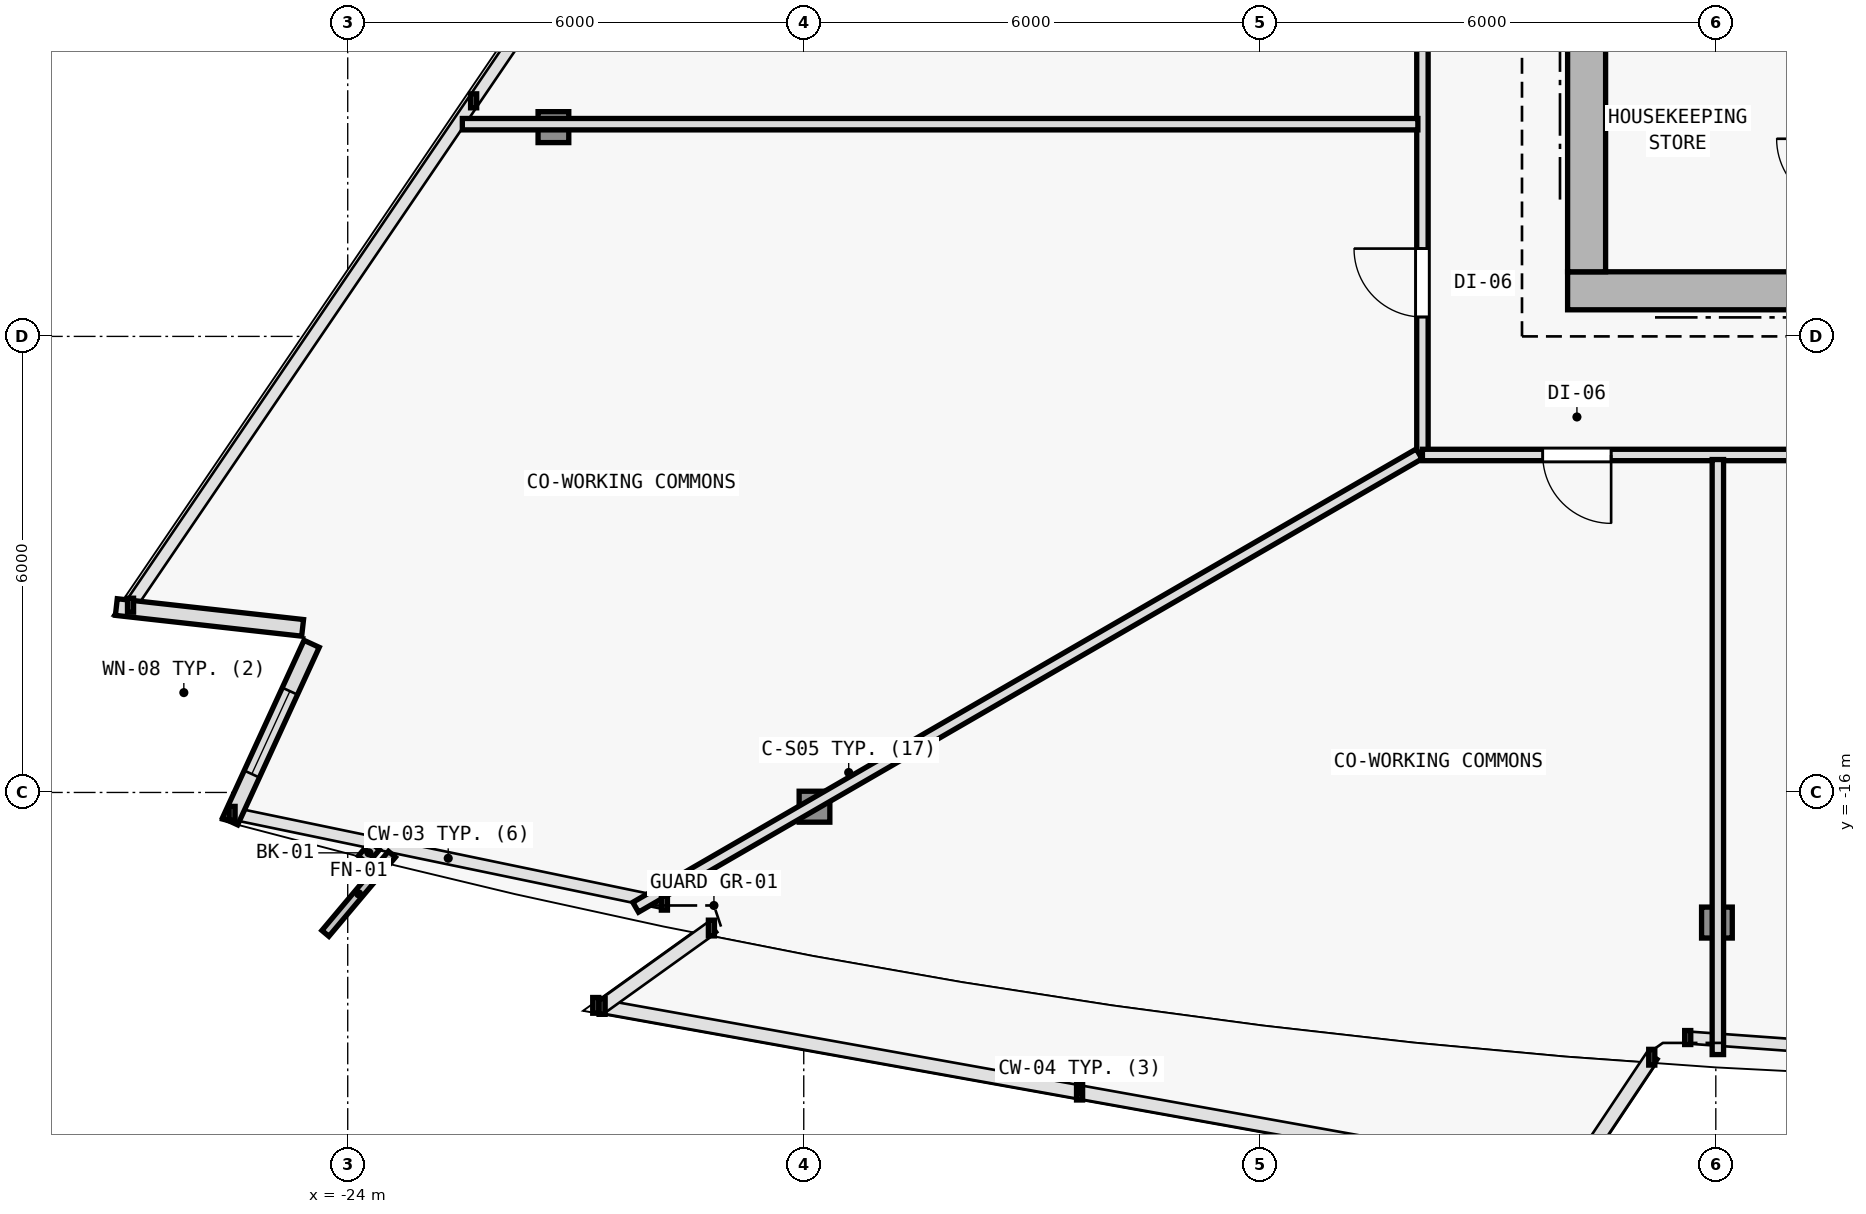
"""IFC4 building model, lengths in metres.
Left out: names, types, materials, properties, quantities, classifications, styles, units other than length and angle.
Written with IfcOpenShell. Run it as: python <this file> out.ifc"""

import sys

from ifc_helpers import new_model, si_unit, direction, frame, frame_2d, origin, origin_2d, place, context, subcontext, project, spatial, rectangle, i_section, extrude, element, fill, save


model = new_model("IFC4")
c1 = context("Model", 3, precision=1e-05, world=origin(), true_north=direction((0.0, 1.0)))
c2 = subcontext(c1, "Body", "Model", "MODEL_VIEW")
j1 = project(units=[si_unit("LENGTHUNIT", "METRE"), si_unit("PLANEANGLEUNIT", "RADIAN")], contexts=[c1])
p1 = place(None, origin())
s1 = spatial("IfcSite", under=j1, at=p1, CompositionType="ELEMENT")
p2 = place(p1, origin())
s2 = spatial("IfcBuilding", under=s1, at=p2, CompositionType="ELEMENT")
p3 = place(p2, frame((0.0, 0.0, 153.0)))
s3 = spatial("IfcBuildingStorey", under=s2, at=p3, CompositionType="ELEMENT", Elevation=153.0)
p4 = place(p3, frame((-7.7, -9.4, 0.0), z_axis=(0.0, 0.0, 1.0), x_axis=(1.0, 0.0, 0.0)))
e1 = element("IfcColumn", 1, at=p4, inside=s3, PredefinedType="COLUMN", context=c2, shape_type="SweptSolid", body=[
    extrude(i_section(OverallWidth=0.404, OverallDepth=0.407, WebThickness=0.017, FlangeThickness=0.028, FilletRadius=0.015, at=origin_2d()), origin(), (0.0, 0.0, 1.0), 3.6),
])
p5 = place(p3, frame((-17.859, -16.187, 0.006), z_axis=(0.020596292833, 0.033511459955, 0.999226087917), x_axis=(-0.851954850327, 0.523615252838, 0.0)))
e2 = element("IfcColumn", 2, at=p5, inside=s3, PredefinedType="COLUMN", context=c2, shape_type="SweptSolid", body=[
    extrude(i_section(OverallWidth=0.404, OverallDepth=0.407, WebThickness=0.017, FlangeThickness=0.028, FilletRadius=0.015, at=origin_2d()), origin(), (0.0, 0.0, 1.0), 3.592),
])
p6 = place(p3, frame((-5.985, -17.712, 0.006), z_axis=(0.006866324617, 0.035215407439, 0.999356157066), x_axis=(-0.981516643497, 0.191376797284, 0.0)))
e3 = element("IfcColumn", 3, at=p6, inside=s3, PredefinedType="COLUMN", context=c2, shape_type="SweptSolid", body=[
    extrude(i_section(OverallWidth=0.404, OverallDepth=0.407, WebThickness=0.017, FlangeThickness=0.028, FilletRadius=0.015, at=origin_2d()), origin(), (0.0, 0.0, 1.0), 3.591),
])
p7 = place(p3, frame((-21.294, -7.247, 0.006), z_axis=(0.025292109804, 0.02162067451, 0.999446274502), x_axis=(-0.649781149204, 0.760121344352, 0.0)))
e4 = element("IfcColumn", 4, at=p7, inside=s3, PredefinedType="COLUMN", context=c2, shape_type="SweptSolid", body=[
    extrude(i_section(OverallWidth=0.404, OverallDepth=0.407, WebThickness=0.017, FlangeThickness=0.028, FilletRadius=0.015, at=origin_2d()), origin(), (0.0, 0.0, 1.0), 3.591),
])
p8 = place(p3, frame((-24.594, -13.834, 0.0), z_axis=(0.0, 0.0, 1.0), x_axis=(-0.993823222634, 0.110974781609, 0.0)))
e5 = element("IfcWall", 5, at=p8, inside=s3, PredefinedType="SOLIDWALL", context=c2, shape_type="SweptSolid", body=[
    extrude(rectangle(XDim=2.466, YDim=0.22, at=frame_2d((1.233, 0.0))), origin(), (0.0, 0.0, 1.0), 3.35),
])
p9 = place(p3, frame((-25.548, -16.38, 0.0), z_axis=(0.0, 0.0, 1.0), x_axis=(0.417449299542, 0.908700215864, 0.0)))
e6 = element("IfcWall", 6, at=p9, inside=s3, PredefinedType="SOLIDWALL", context=c2, shape_type="SweptSolid", body=[
    extrude(rectangle(XDim=2.57, YDim=0.22, at=frame_2d((1.285, 0.0))), origin(), (0.0, 0.0, 1.0), 3.35),
])
p10 = place(p9, frame((0.685, 0.0, 0.62)))
e7 = element("IfcOpeningElement", 7, at=p10, cuts=e6, PredefinedType="OPENING", context=c2, shape_type="SweptSolid", body=[
    extrude(rectangle(XDim=1.2, YDim=1.8, at=frame_2d((0.6, 0.9))), frame((0.0, 0.12, 0.0), z_axis=(0.0, -1.0, 0.0), x_axis=(1.0, 0.0, 0.0)), (0.0, 0.0, 1.0), 0.24),
])
p11 = place(p3, frame((-7.95, -9.4, 0.0), z_axis=(0.0, 0.0, 1.0), x_axis=(1.0, 0.0, 0.0)))
e8 = element("IfcWall", 8, at=p11, inside=s3, PredefinedType="SHEAR", context=c2, shape_type="SweptSolid", body=[
    extrude(rectangle(XDim=15.9, YDim=0.5, at=frame_2d((7.95, 0.0))), origin(), (0.0, 0.0, 1.0), 3.35),
])
p12 = place(p11, frame((9.6, 0.0, 0.0)))
e9 = element("IfcOpeningElement", 9, at=p12, cuts=e8, PredefinedType="OPENING", context=c2, shape_type="SweptSolid", body=[
    extrude(rectangle(XDim=1.5, YDim=2.2, at=frame_2d((0.75, 1.1))), frame((0.0, 0.26, 0.0), z_axis=(0.0, -1.0, 0.0), x_axis=(1.0, 0.0, 0.0)), (0.0, 0.0, 1.0), 0.52),
])
p13 = place(p3, frame((-7.7, -9.15, 0.0), z_axis=(0.0, 0.0, 1.0), x_axis=(0.0, 1.0, 0.0)))
e10 = element("IfcWall", 10, at=p13, inside=s3, PredefinedType="SHEAR", context=c2, shape_type="SweptSolid", body=[
    extrude(rectangle(XDim=19.1, YDim=0.5, at=frame_2d((9.55, 0.0))), origin(), (0.0, 0.0, 1.0), 3.35),
])
p14 = place(p13, frame((12.7, 0.0, 0.0)))
e11 = element("IfcOpeningElement", 11, at=p14, cuts=e10, PredefinedType="OPENING", context=c2, shape_type="SweptSolid", body=[
    extrude(rectangle(XDim=1.1, YDim=2.15, at=frame_2d((0.55, 1.075))), frame((0.0, 0.26, 0.0), z_axis=(0.0, -1.0, 0.0), x_axis=(1.0, 0.0, 0.0)), (0.0, 0.0, 1.0), 0.52),
])
p15 = place(p3, frame((-9.86, -11.56, 0.0), z_axis=(0.0, 0.0, 1.0), x_axis=(0.0, 1.0, 0.0)))
e12 = element("IfcWall", 12, at=p15, inside=s3, PredefinedType="PARTITIONING", context=c2, shape_type="SweptSolid", body=[
    extrude(rectangle(XDim=19.986, YDim=0.15, at=frame_2d((9.993, 0.0))), origin(), (0.0, 0.0, 1.0), 2.775),
])
p16 = place(p15, frame((11.446, 0.0, 0.0)))
e13 = element("IfcOpeningElement", 13, at=p16, cuts=e12, PredefinedType="OPENING", context=c2, shape_type="SweptSolid", body=[
    extrude(rectangle(XDim=0.85, YDim=2.1, at=frame_2d((0.425, 1.05))), frame((0.0, 0.085, 0.0), z_axis=(0.0, -1.0, 0.0), x_axis=(1.0, 0.0, 0.0)), (0.0, 0.0, 1.0), 0.17),
])
p17 = place(p15, frame((10.069, 0.0, 0.0)))
e14 = element("IfcOpeningElement", 14, at=p17, cuts=e12, PredefinedType="OPENING", context=c2, shape_type="SweptSolid", body=[
    extrude(rectangle(XDim=0.85, YDim=2.1, at=frame_2d((0.425, 1.05))), frame((0.0, 0.085, 0.0), z_axis=(0.0, -1.0, 0.0), x_axis=(1.0, 0.0, 0.0)), (0.0, 0.0, 1.0), 0.17),
])
p18 = place(p15, frame((8.15, 0.0, 0.0)))
e15 = element("IfcOpeningElement", 15, at=p18, cuts=e12, PredefinedType="OPENING", context=c2, shape_type="SweptSolid", body=[
    extrude(rectangle(XDim=0.9, YDim=2.1, at=frame_2d((0.45, 1.05))), frame((0.0, 0.085, 0.0), z_axis=(0.0, -1.0, 0.0), x_axis=(1.0, 0.0, 0.0)), (0.0, 0.0, 1.0), 0.17),
])
p19 = place(p15, frame((5.396, 0.0, 0.0)))
e16 = element("IfcOpeningElement", 16, at=p19, cuts=e12, PredefinedType="OPENING", context=c2, shape_type="SweptSolid", body=[
    extrude(rectangle(XDim=0.9, YDim=2.1, at=frame_2d((0.45, 1.05))), frame((0.0, 0.085, 0.0), z_axis=(0.0, -1.0, 0.0), x_axis=(1.0, 0.0, 0.0)), (0.0, 0.0, 1.0), 0.17),
])
p20 = place(p15, frame((1.815, 0.0, 0.0)))
e17 = element("IfcOpeningElement", 17, at=p20, cuts=e12, PredefinedType="OPENING", context=c2, shape_type="SweptSolid", body=[
    extrude(rectangle(XDim=0.9, YDim=2.1, at=frame_2d((0.45, 1.05))), frame((0.0, 0.085, 0.0), z_axis=(0.0, -1.0, 0.0), x_axis=(1.0, 0.0, 0.0)), (0.0, 0.0, 1.0), 0.17),
])
p21 = place(p15, frame((13.306, 0.0, 0.0)))
e18 = element("IfcOpeningElement", 18, at=p21, cuts=e12, PredefinedType="OPENING", context=c2, shape_type="SweptSolid", body=[
    extrude(rectangle(XDim=0.9, YDim=2.1, at=frame_2d((0.45, 1.05))), frame((0.0, 0.085, 0.0), z_axis=(0.0, -1.0, 0.0), x_axis=(1.0, 0.0, 0.0)), (0.0, 0.0, 1.0), 0.17),
])
p22 = place(p3, frame((13.18, -11.56, 0.0), z_axis=(0.0, 0.0, 1.0), x_axis=(-1.0, 0.0, 0.0)))
e19 = element("IfcWall", 19, at=p22, inside=s3, PredefinedType="PARTITIONING", context=c2, shape_type="SweptSolid", body=[
    extrude(rectangle(XDim=23.04, YDim=0.15, at=frame_2d((11.52, 0.0))), origin(), (0.0, 0.0, 1.0), 2.725),
])
p23 = place(p22, frame((20.557, 0.0, 0.0)))
e20 = element("IfcOpeningElement", 20, at=p23, cuts=e19, PredefinedType="OPENING", context=c2, shape_type="SweptSolid", body=[
    extrude(rectangle(XDim=0.9, YDim=2.1, at=frame_2d((0.45, 1.05))), frame((0.0, 0.085, 0.0), z_axis=(0.0, -1.0, 0.0), x_axis=(1.0, 0.0, 0.0)), (0.0, 0.0, 1.0), 0.17),
])
p24 = place(p22, frame((10.328, 0.0, 0.0)))
e21 = element("IfcOpeningElement", 21, at=p24, cuts=e19, PredefinedType="OPENING", context=c2, shape_type="SweptSolid", body=[
    extrude(rectangle(XDim=0.9, YDim=2.1, at=frame_2d((0.45, 1.05))), frame((0.0, 0.085, 0.0), z_axis=(0.0, -1.0, 0.0), x_axis=(1.0, 0.0, 0.0)), (0.0, 0.0, 1.0), 0.17),
])
p25 = place(p3, frame((-9.903, -11.546, 0.0), z_axis=(0.0, 0.0, 1.0), x_axis=(-0.865562397441, -0.500801094384, 0.0)))
e22 = element("IfcWall", 22, at=p25, inside=s3, PredefinedType="PARTITIONING", context=c2, shape_type="SweptSolid", body=[
    extrude(rectangle(XDim=11.909, YDim=0.15, at=frame_2d((5.955, 0.0))), origin(), (0.0, 0.0, 1.0), 2.775),
])
p26 = place(p3, frame((-5.973, -11.62, 0.0), z_axis=(0.0, 0.0, 1.0), x_axis=(0.0, -1.0, 0.0)))
e23 = element("IfcWall", 23, at=p26, inside=s3, PredefinedType="PARTITIONING", context=c2, shape_type="SweptSolid", body=[
    extrude(rectangle(XDim=7.828, YDim=0.15, at=frame_2d((3.914, 0.0))), origin(), (0.0, 0.0, 1.0), 2.885),
])
p27 = place(p3, frame((-9.92, -7.208, 0.0), z_axis=(0.0, 0.0, 1.0), x_axis=(-1.0, 0.0, 0.0)))
e24 = element("IfcWall", 24, at=p27, inside=s3, PredefinedType="PARTITIONING", context=c2, shape_type="SweptSolid", body=[
    extrude(rectangle(XDim=12.572, YDim=0.15, at=frame_2d((6.286, 0.0))), origin(), (0.0, 0.0, 1.0), 2.775),
])
p28 = place(p10, origin())
e25 = element("IfcWindow", 25, at=p28, inside=s3, PartitioningType="SINGLE_PANEL", PredefinedType="WINDOW", context=c2, shape_type="SweptSolid", body=[
    extrude(rectangle(XDim=1.2, YDim=1.8, at=frame_2d((0.6, 0.9))), frame((0.0, 0.03, 0.0), z_axis=(0.0, -1.0, 0.0), x_axis=(1.0, 0.0, 0.0)), (0.0, 0.0, 1.0), 0.06),
])
fill(e7, e25)
p29 = place(p20, origin())
e26 = element("IfcDoor", 26, at=p29, inside=s3, OperationType="SINGLE_SWING_RIGHT", PredefinedType="DOOR", context=c2, shape_type="SweptSolid", body=[
    extrude(rectangle(XDim=0.9, YDim=2.1, at=frame_2d((0.45, 1.05))), frame((0.0, 0.025, 0.0), z_axis=(0.0, -1.0, 0.0), x_axis=(1.0, 0.0, 0.0)), (0.0, 0.0, 1.0), 0.05),
])
fill(e17, e26)
p30 = place(p23, origin())
e27 = element("IfcDoor", 27, at=p30, inside=s3, OperationType="SINGLE_SWING_LEFT", PredefinedType="DOOR", context=c2, shape_type="SweptSolid", body=[
    extrude(rectangle(XDim=0.9, YDim=2.1, at=frame_2d((0.45, 1.05))), frame((0.0, 0.025, 0.0), z_axis=(0.0, -1.0, 0.0), x_axis=(1.0, 0.0, 0.0)), (0.0, 0.0, 1.0), 0.05),
])
fill(e20, e27)
save(model, sys.argv[1])
